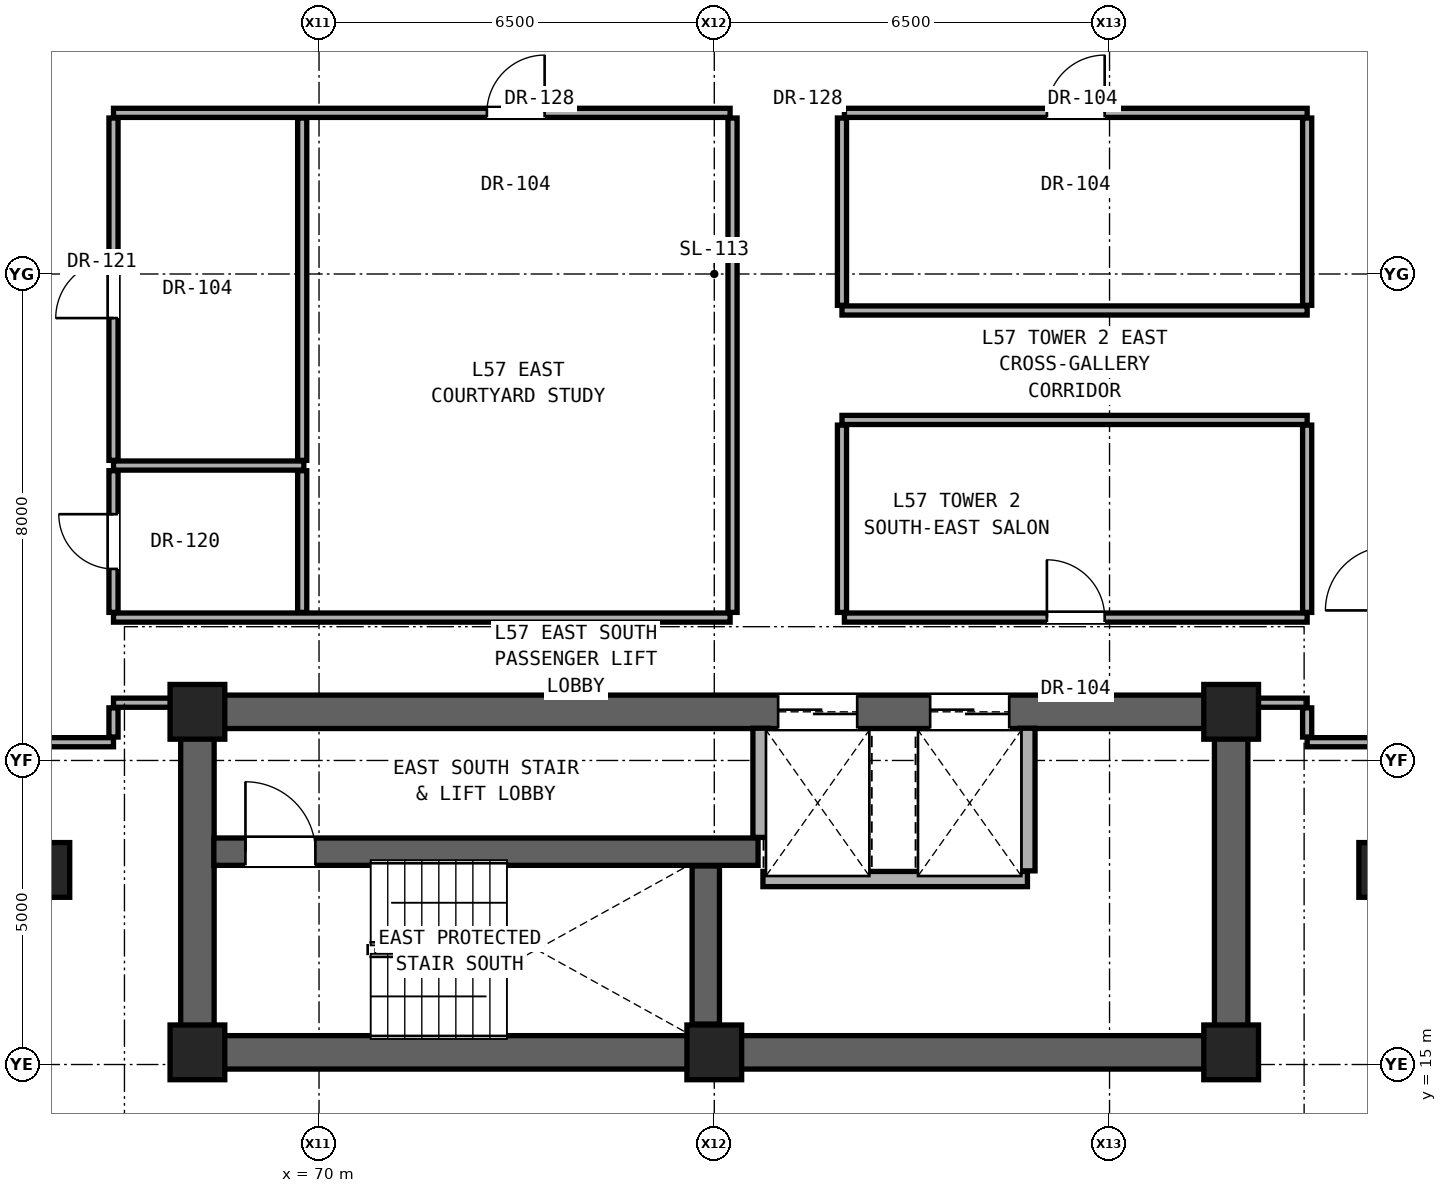
"""IFC4 building model, lengths in metres.
Left out: names, types, materials, properties, quantities, classifications, styles, units other than length and angle.
Written with IfcOpenShell. Run it as: python <this file> out.ifc"""

import sys

from ifc_helpers import new_model, si_unit, direction, frame, frame_2d, origin, origin_2d, place, context, subcontext, project, spatial, rectangle, extrude, element, fill, save


model = new_model("IFC4")
c1 = context("Model", 3, precision=1e-05, world=origin(), true_north=direction((0.0, 1.0)))
c2 = subcontext(c1, "Body", "Model", "MODEL_VIEW")
j1 = project(units=[si_unit("LENGTHUNIT", "METRE"), si_unit("PLANEANGLEUNIT", "RADIAN")], contexts=[c1])
p1 = place(None, origin())
s1 = spatial("IfcSite", under=j1, at=p1, CompositionType="ELEMENT")
p2 = place(p1, origin())
s2 = spatial("IfcBuilding", under=s1, at=p2, CompositionType="ELEMENT")
p3 = place(p2, frame((0.0, 0.0, 199.9)))
s3 = spatial("IfcBuildingStorey", under=s2, at=p3, CompositionType="ELEMENT", Elevation=199.9)
for number, where, z_axis, x_axis in (
    (1, (68.0, 15.2, 0.0), (0.0, 0.0, 1.0), (1.0, 0.0, 0.0)),
    (2, (76.5, 15.2, 0.0), (0.0, 0.0, 1.0), (1.0, 0.0, 0.0)),
    (3, (85.0, 15.2, 0.0), (0.0, 0.0, 1.0), (1.0, 0.0, 0.0)),
    (4, (68.0, 20.8, 0.0), (0.0, 0.0, 1.0), (1.0, 0.0, 0.0)),
    (5, (85.0, 20.8, 0.0), (0.0, 0.0, 1.0), (1.0, 0.0, 0.0)),
):
    element("IfcColumn", number, at=place(p3, frame(where, z_axis=z_axis, x_axis=x_axis)), inside=s3, PredefinedType="COLUMN", context=c2, shape_type="SweptSolid", body=[
        extrude(rectangle(XDim=0.9, YDim=0.9, at=origin_2d()), origin(), (0.0, 0.0, 1.0), 3.25),
    ])
for number, where, z_axis, x_axis in (
    (6, (65.6, 18.2, 0.0), (0.0, 0.0, 1.0), (1.0, 0.0, 0.0)),
    (7, (87.4, 18.2, 0.0), (0.0, 0.0, 1.0), (1.0, 0.0, 0.0)),
):
    element("IfcColumn", number, at=place(p3, frame(where, z_axis=z_axis, x_axis=x_axis)), inside=s3, PredefinedType="PILASTER", context=c2, shape_type="SweptSolid", body=[
        extrude(rectangle(XDim=0.6, YDim=0.9, at=origin_2d()), origin(), (0.0, 0.0, 1.0), 3.25),
    ])
p4 = place(p3, frame((68.0, 15.2, 0.0), z_axis=(0.0, 0.0, 1.0), x_axis=(1.0, 0.0, 0.0)))
e8 = element("IfcWall", 8, at=p4, inside=s3, PredefinedType="SHEAR", context=c2, shape_type="SweptSolid", body=[
    extrude(rectangle(XDim=17.0, YDim=0.55, at=frame_2d((8.5, 0.0))), origin(), (0.0, 0.0, 1.0), 3.05),
])
for number, where, z_axis, x_axis in (
    (9, (68.0, 15.2, 0.0), (0.0, 0.0, 1.0), (0.0, 1.0, 0.0)),
    (10, (85.0, 15.2, 0.0), (0.0, 0.0, 1.0), (0.0, 1.0, 0.0)),
):
    element("IfcWall", number, at=place(p3, frame(where, z_axis=z_axis, x_axis=x_axis)), inside=s3, PredefinedType="SHEAR", context=c2, shape_type="SweptSolid", body=[
        extrude(rectangle(XDim=5.6, YDim=0.55, at=frame_2d((2.8, 0.0))), origin(), (0.0, 0.0, 1.0), 3.05),
    ])
p5 = place(p3, frame((68.0, 20.8, 0.0), z_axis=(0.0, 0.0, 1.0), x_axis=(1.0, 0.0, 0.0)))
e11 = element("IfcWall", 11, at=p5, inside=s3, PredefinedType="SHEAR", context=c2, shape_type="SweptSolid", body=[
    extrude(rectangle(XDim=17.0, YDim=0.55, at=frame_2d((8.5, 0.0))), origin(), (0.0, 0.0, 1.0), 3.05),
])
p6 = place(p5, frame((9.55, 0.0, 0.0)))
e12 = element("IfcOpeningElement", 12, at=p6, cuts=e11, PredefinedType="OPENING", context=c2, shape_type="SweptSolid", body=[
    extrude(rectangle(XDim=1.3, YDim=2.3, at=frame_2d((0.65, 1.15))), frame((0.0, 0.285, 0.0), z_axis=(0.0, -1.0, 0.0), x_axis=(1.0, 0.0, 0.0)), (0.0, 0.0, 1.0), 0.57),
])
p7 = place(p5, frame((12.05, 0.0, 0.0)))
e13 = element("IfcOpeningElement", 13, at=p7, cuts=e11, PredefinedType="OPENING", context=c2, shape_type="SweptSolid", body=[
    extrude(rectangle(XDim=1.3, YDim=2.3, at=frame_2d((0.65, 1.15))), frame((0.0, 0.285, 0.0), z_axis=(0.0, -1.0, 0.0), x_axis=(1.0, 0.0, 0.0)), (0.0, 0.0, 1.0), 0.57),
])
p8 = place(p3, frame((77.3, 18.05, 0.0), z_axis=(0.0, 0.0, 1.0), x_axis=(1.0, 0.0, 0.0)))
e14 = element("IfcWall", 14, at=p8, inside=s3, PredefinedType="SOLIDWALL", context=c2, shape_type="SweptSolid", body=[
    extrude(rectangle(XDim=4.35, YDim=0.25, at=frame_2d((2.175, 0.0))), origin(), (0.0, 0.0, 1.0), 3.05),
])
p9 = place(p3, frame((68.27, 18.5, 0.0), z_axis=(0.0, 0.0, 1.0), x_axis=(1.0, 0.0, 0.0)))
e15 = element("IfcWall", 15, at=p9, inside=s3, PredefinedType="SHEAR", context=c2, shape_type="SweptSolid", body=[
    extrude(rectangle(XDim=8.95, YDim=0.45, at=frame_2d((4.475, 0.0))), origin(), (0.0, 0.0, 1.0), 3.05),
])
p10 = place(p9, frame((0.52, 0.0, 0.0)))
e16 = element("IfcOpeningElement", 16, at=p10, cuts=e15, PredefinedType="OPENING", context=c2, shape_type="SweptSolid", body=[
    extrude(rectangle(XDim=1.15, YDim=2.2, at=frame_2d((0.575, 1.1))), frame((0.0, 0.235, 0.0), z_axis=(0.0, -1.0, 0.0), x_axis=(1.0, 0.0, 0.0)), (0.0, 0.0, 1.0), 0.47),
])
p11 = place(p3, frame((65.25, 20.3, 0.0), z_axis=(0.0, 0.0, 1.0), x_axis=(1.0, 0.0, 0.0)))
e17 = element("IfcWall", 17, at=p11, inside=s3, PredefinedType="PARTITIONING", context=c2, shape_type="SweptSolid", body=[
    extrude(rectangle(XDim=1.37, YDim=0.15, at=frame_2d((0.685, 0.0))), origin(), (0.0, 0.0, 1.0), 3.05),
])
p12 = place(p3, frame((86.25, 20.3, 0.0), z_axis=(0.0, 0.0, 1.0), x_axis=(1.0, 0.0, 0.0)))
e18 = element("IfcWall", 18, at=p12, inside=s3, PredefinedType="PARTITIONING", context=c2, shape_type="SweptSolid", body=[
    extrude(rectangle(XDim=1.35, YDim=0.15, at=frame_2d((0.675, 0.0))), origin(), (0.0, 0.0, 1.0), 3.05),
])
p13 = place(p3, frame((66.62, 20.95, 0.0), z_axis=(0.0, 0.0, 1.0), x_axis=(1.0, 0.0, 0.0)))
e19 = element("IfcWall", 19, at=p13, inside=s3, PredefinedType="PARTITIONING", context=c2, shape_type="SweptSolid", body=[
    extrude(rectangle(XDim=1.11, YDim=0.15, at=frame_2d((0.555, 0.0))), origin(), (0.0, 0.0, 1.0), 2.442),
])
p14 = place(p3, frame((85.27, 20.95, 0.0), z_axis=(0.0, 0.0, 1.0), x_axis=(1.0, 0.0, 0.0)))
e20 = element("IfcWall", 20, at=p14, inside=s3, PredefinedType="PARTITIONING", context=c2, shape_type="SweptSolid", body=[
    extrude(rectangle(XDim=0.98, YDim=0.15, at=frame_2d((0.49, 0.0))), origin(), (0.0, 0.0, 1.0), 2.442),
])
p15 = place(p3, frame((66.62, 22.35, 0.0), z_axis=(0.0, 0.0, 1.0), x_axis=(1.0, 0.0, 0.0)))
e21 = element("IfcWall", 21, at=p15, inside=s3, PredefinedType="PARTITIONING", context=c2, shape_type="SweptSolid", body=[
    extrude(rectangle(XDim=10.14, YDim=0.15, at=frame_2d((5.07, 0.0))), origin(), (0.0, 0.0, 1.0), 2.186),
])
p16 = place(p3, frame((78.64, 22.35, 0.0), z_axis=(0.0, 0.0, 1.0), x_axis=(1.0, 0.0, 0.0)))
e22 = element("IfcWall", 22, at=p16, inside=s3, PredefinedType="PARTITIONING", context=c2, shape_type="SweptSolid", body=[
    extrude(rectangle(XDim=7.61, YDim=0.15, at=frame_2d((3.805, 0.0))), origin(), (0.0, 0.0, 1.0), 2.186),
])
p17 = place(p16, frame((3.33, 0.0, 0.0)))
e23 = element("IfcOpeningElement", 23, at=p17, cuts=e22, PredefinedType="OPENING", context=c2, shape_type="SweptSolid", body=[
    extrude(rectangle(XDim=0.95, YDim=2.15, at=frame_2d((0.475, 1.075))), frame((0.0, 0.085, 0.0), z_axis=(0.0, -1.0, 0.0), x_axis=(1.0, 0.0, 0.0)), (0.0, 0.0, 1.0), 0.17),
])
p18 = place(p3, frame((66.62, 24.85, 0.0), z_axis=(0.0, 0.0, 1.0), x_axis=(1.0, 0.0, 0.0)))
e24 = element("IfcWall", 24, at=p18, inside=s3, PredefinedType="PARTITIONING", context=c2, shape_type="SweptSolid", body=[
    extrude(rectangle(XDim=3.13, YDim=0.15, at=frame_2d((1.565, 0.0))), origin(), (0.0, 0.0, 1.0), 2.186),
])
for number, where, z_axis, x_axis in (
    (25, (78.6, 25.6, 0.0), (0.0, 0.0, 1.0), (1.0, 0.0, 0.0)),
    (26, (78.6, 27.4, 0.0), (0.0, 0.0, 1.0), (1.0, 0.0, 0.0)),
):
    element("IfcWall", number, at=place(p3, frame(where, z_axis=z_axis, x_axis=x_axis)), inside=s3, PredefinedType="PARTITIONING", context=c2, shape_type="SweptSolid", body=[
        extrude(rectangle(XDim=7.65, YDim=0.15, at=frame_2d((3.825, 0.0))), origin(), (0.0, 0.0, 1.0), 2.186),
    ])
p19 = place(p3, frame((66.62, 30.65, 0.0), z_axis=(0.0, 0.0, 1.0), x_axis=(1.0, 0.0, 0.0)))
e27 = element("IfcWall", 27, at=p19, inside=s3, PredefinedType="PARTITIONING", context=c2, shape_type="SweptSolid", body=[
    extrude(rectangle(XDim=10.14, YDim=0.15, at=frame_2d((5.07, 0.0))), origin(), (0.0, 0.0, 1.0), 2.186),
])
p20 = place(p19, frame((6.14, 0.0, 0.0)))
e28 = element("IfcOpeningElement", 28, at=p20, cuts=e27, PredefinedType="OPENING", context=c2, shape_type="SweptSolid", body=[
    extrude(rectangle(XDim=0.95, YDim=2.15, at=frame_2d((0.475, 1.075))), frame((0.0, 0.085, 0.0), z_axis=(0.0, -1.0, 0.0), x_axis=(1.0, 0.0, 0.0)), (0.0, 0.0, 1.0), 0.17),
])
p21 = place(p3, frame((78.64, 30.65, 0.0), z_axis=(0.0, 0.0, 1.0), x_axis=(1.0, 0.0, 0.0)))
e29 = element("IfcWall", 29, at=p21, inside=s3, PredefinedType="PARTITIONING", context=c2, shape_type="SweptSolid", body=[
    extrude(rectangle(XDim=7.61, YDim=0.15, at=frame_2d((3.805, 0.0))), origin(), (0.0, 0.0, 1.0), 2.186),
])
p22 = place(p21, frame((3.33, 0.0, 0.0)))
e30 = element("IfcOpeningElement", 30, at=p22, cuts=e29, PredefinedType="OPENING", context=c2, shape_type="SweptSolid", body=[
    extrude(rectangle(XDim=0.95, YDim=2.15, at=frame_2d((0.475, 1.075))), frame((0.0, 0.085, 0.0), z_axis=(0.0, -1.0, 0.0), x_axis=(1.0, 0.0, 0.0)), (0.0, 0.0, 1.0), 0.17),
])
p23 = place(p3, frame((66.62, 20.385, 0.0), z_axis=(0.0, 0.0, 1.0), x_axis=(0.0, 1.0, 0.0)))
e31 = element("IfcWall", 31, at=p23, inside=s3, PredefinedType="PARTITIONING", context=c2, shape_type="SweptSolid", body=[
    extrude(rectangle(XDim=0.48, YDim=0.15, at=frame_2d((0.24, 0.0))), origin(), (0.0, 0.0, 1.0), 2.442),
])
p24 = place(p3, frame((66.62, 22.435, 0.0), z_axis=(0.0, 0.0, 1.0), x_axis=(0.0, 1.0, 0.0)))
e32 = element("IfcWall", 32, at=p24, inside=s3, PredefinedType="PARTITIONING", context=c2, shape_type="SweptSolid", body=[
    extrude(rectangle(XDim=2.33, YDim=0.15, at=frame_2d((1.165, 0.0))), origin(), (0.0, 0.0, 1.0), 3.05),
])
p25 = place(p24, frame((0.715, 0.0, 0.0)))
e33 = element("IfcOpeningElement", 33, at=p25, cuts=e32, PredefinedType="OPENING", context=c2, shape_type="SweptSolid", body=[
    extrude(rectangle(XDim=0.9, YDim=2.1, at=frame_2d((0.45, 1.05))), frame((0.0, 0.085, 0.0), z_axis=(0.0, -1.0, 0.0), x_axis=(1.0, 0.0, 0.0)), (0.0, 0.0, 1.0), 0.17),
])
p26 = place(p3, frame((66.62, 24.935, 0.0), z_axis=(0.0, 0.0, 1.0), x_axis=(0.0, 1.0, 0.0)))
e34 = element("IfcWall", 34, at=p26, inside=s3, PredefinedType="PARTITIONING", context=c2, shape_type="SweptSolid", body=[
    extrude(rectangle(XDim=5.63, YDim=0.15, at=frame_2d((2.815, 0.0))), origin(), (0.0, 0.0, 1.0), 2.346),
])
p27 = place(p26, frame((2.34, 0.0, 0.0)))
e35 = element("IfcOpeningElement", 35, at=p27, cuts=e34, PredefinedType="OPENING", context=c2, shape_type="SweptSolid", body=[
    extrude(rectangle(XDim=0.95, YDim=2.15, at=frame_2d((0.475, 1.075))), frame((0.0, 0.085, 0.0), z_axis=(0.0, -1.0, 0.0), x_axis=(1.0, 0.0, 0.0)), (0.0, 0.0, 1.0), 0.17),
])
p28 = place(p3, frame((69.723, 22.435, 0.0), z_axis=(0.0, 0.0, 1.0), x_axis=(0.0, 1.0, 0.0)))
e36 = element("IfcWall", 36, at=p28, inside=s3, PredefinedType="PARTITIONING", context=c2, shape_type="SweptSolid", body=[
    extrude(rectangle(XDim=2.33, YDim=0.15, at=frame_2d((1.165, 0.0))), origin(), (0.0, 0.0, 1.0), 3.05),
])
p29 = place(p3, frame((69.723, 24.935, 0.0), z_axis=(0.0, 0.0, 1.0), x_axis=(0.0, 1.0, 0.0)))
e37 = element("IfcWall", 37, at=p29, inside=s3, PredefinedType="PARTITIONING", context=c2, shape_type="SweptSolid", body=[
    extrude(rectangle(XDim=5.63, YDim=0.15, at=frame_2d((2.815, 0.0))), origin(), (0.0, 0.0, 1.0), 2.186),
])
p30 = place(p3, frame((76.36, 15.665, 0.0), z_axis=(0.0, 0.0, 1.0), x_axis=(0.0, 1.0, 0.0)))
e38 = element("IfcWall", 38, at=p30, inside=s3, PredefinedType="SHEAR", context=c2, shape_type="SweptSolid", body=[
    extrude(rectangle(XDim=2.6, YDim=0.45, at=frame_2d((1.3, 0.0))), origin(), (0.0, 0.0, 1.0), 3.05),
])
p31 = place(p3, frame((76.8, 22.435, 0.0), z_axis=(0.0, 0.0, 1.0), x_axis=(0.0, 1.0, 0.0)))
e39 = element("IfcWall", 39, at=p31, inside=s3, PredefinedType="PARTITIONING", context=c2, shape_type="SweptSolid", body=[
    extrude(rectangle(XDim=8.13, YDim=0.15, at=frame_2d((4.065, 0.0))), origin(), (0.0, 0.0, 1.0), 2.186),
])
p32 = place(p3, frame((77.26, 18.735, 0.0), z_axis=(0.0, 0.0, 1.0), x_axis=(0.0, 1.0, 0.0)))
e40 = element("IfcWall", 40, at=p32, inside=s3, PredefinedType="SOLIDWALL", context=c2, shape_type="SweptSolid", body=[
    extrude(rectangle(XDim=1.795, YDim=0.25, at=frame_2d((0.897, 0.0))), origin(), (0.0, 0.0, 1.0), 3.05),
])
p33 = place(p3, frame((78.6, 22.435, 0.0), z_axis=(0.0, 0.0, 1.0), x_axis=(0.0, 1.0, 0.0)))
e41 = element("IfcWall", 41, at=p33, inside=s3, PredefinedType="PARTITIONING", context=c2, shape_type="SweptSolid", body=[
    extrude(rectangle(XDim=3.08, YDim=0.15, at=frame_2d((1.54, 0.0))), origin(), (0.0, 0.0, 1.0), 3.05),
])
p34 = place(p3, frame((78.6, 27.485, 0.0), z_axis=(0.0, 0.0, 1.0), x_axis=(0.0, 1.0, 0.0)))
e42 = element("IfcWall", 42, at=p34, inside=s3, PredefinedType="PARTITIONING", context=c2, shape_type="SweptSolid", body=[
    extrude(rectangle(XDim=3.08, YDim=0.15, at=frame_2d((1.54, 0.0))), origin(), (0.0, 0.0, 1.0), 2.186),
])
p35 = place(p3, frame((81.65, 18.185, 0.0), z_axis=(0.0, 0.0, 1.0), x_axis=(0.0, 1.0, 0.0)))
e43 = element("IfcWall", 43, at=p35, inside=s3, PredefinedType="SOLIDWALL", context=c2, shape_type="SweptSolid", body=[
    extrude(rectangle(XDim=2.345, YDim=0.25, at=frame_2d((1.172, 0.0))), origin(), (0.0, 0.0, 1.0), 3.05),
])
p36 = place(p3, frame((86.25, 20.385, 0.0), z_axis=(0.0, 0.0, 1.0), x_axis=(0.0, 1.0, 0.0)))
e44 = element("IfcWall", 44, at=p36, inside=s3, PredefinedType="PARTITIONING", context=c2, shape_type="SweptSolid", body=[
    extrude(rectangle(XDim=0.48, YDim=0.15, at=frame_2d((0.24, 0.0))), origin(), (0.0, 0.0, 1.0), 2.442),
])
p37 = place(p3, frame((86.25, 22.435, 0.0), z_axis=(0.0, 0.0, 1.0), x_axis=(0.0, 1.0, 0.0)))
e45 = element("IfcWall", 45, at=p37, inside=s3, PredefinedType="PARTITIONING", context=c2, shape_type="SweptSolid", body=[
    extrude(rectangle(XDim=3.08, YDim=0.15, at=frame_2d((1.54, 0.0))), origin(), (0.0, 0.0, 1.0), 3.05),
])
p38 = place(p3, frame((86.25, 27.485, 0.0), z_axis=(0.0, 0.0, 1.0), x_axis=(0.0, 1.0, 0.0)))
e46 = element("IfcWall", 46, at=p38, inside=s3, PredefinedType="PARTITIONING", context=c2, shape_type="SweptSolid", body=[
    extrude(rectangle(XDim=3.08, YDim=0.15, at=frame_2d((1.54, 0.0))), origin(), (0.0, 0.0, 1.0), 2.346),
])
p39 = place(p10, origin())
e47 = element("IfcDoor", 47, at=p39, inside=s3, OperationType="SINGLE_SWING_LEFT", PredefinedType="DOOR", context=c2, shape_type="SweptSolid", body=[
    extrude(rectangle(XDim=1.15, YDim=2.2, at=frame_2d((0.575, 1.1))), frame((0.0, 0.025, 0.0), z_axis=(0.0, -1.0, 0.0), x_axis=(1.0, 0.0, 0.0)), (0.0, 0.0, 1.0), 0.05),
])
fill(e16, e47)
p40 = place(p25, origin())
e48 = element("IfcDoor", 48, at=p40, inside=s3, OperationType="SINGLE_SWING_RIGHT", PredefinedType="DOOR", context=c2, shape_type="SweptSolid", body=[
    extrude(rectangle(XDim=0.9, YDim=2.1, at=frame_2d((0.45, 1.05))), frame((0.0, 0.025, 0.0), z_axis=(0.0, -1.0, 0.0), x_axis=(1.0, 0.0, 0.0)), (0.0, 0.0, 1.0), 0.05),
])
fill(e33, e48)
p41 = place(p27, origin())
e49 = element("IfcDoor", 49, at=p41, inside=s3, OperationType="SINGLE_SWING_LEFT", PredefinedType="DOOR", context=c2, shape_type="SweptSolid", body=[
    extrude(rectangle(XDim=0.95, YDim=2.15, at=frame_2d((0.475, 1.075))), frame((0.0, 0.025, 0.0), z_axis=(0.0, -1.0, 0.0), x_axis=(1.0, 0.0, 0.0)), (0.0, 0.0, 1.0), 0.05),
])
fill(e35, e49)
p42 = place(p20, origin())
e50 = element("IfcDoor", 50, at=p42, inside=s3, OperationType="SINGLE_SWING_RIGHT", PredefinedType="DOOR", context=c2, shape_type="SweptSolid", body=[
    extrude(rectangle(XDim=0.95, YDim=2.15, at=frame_2d((0.475, 1.075))), frame((0.0, 0.025, 0.0), z_axis=(0.0, -1.0, 0.0), x_axis=(1.0, 0.0, 0.0)), (0.0, 0.0, 1.0), 0.05),
])
fill(e28, e50)
p43 = place(p17, origin())
e51 = element("IfcDoor", 51, at=p43, inside=s3, OperationType="SINGLE_SWING_LEFT", PredefinedType="DOOR", context=c2, shape_type="SweptSolid", body=[
    extrude(rectangle(XDim=0.95, YDim=2.15, at=frame_2d((0.475, 1.075))), frame((0.0, 0.025, 0.0), z_axis=(0.0, -1.0, 0.0), x_axis=(1.0, 0.0, 0.0)), (0.0, 0.0, 1.0), 0.05),
])
fill(e23, e51)
p44 = place(p22, origin())
e52 = element("IfcDoor", 52, at=p44, inside=s3, OperationType="SINGLE_SWING_RIGHT", PredefinedType="DOOR", context=c2, shape_type="SweptSolid", body=[
    extrude(rectangle(XDim=0.95, YDim=2.15, at=frame_2d((0.475, 1.075))), frame((0.0, 0.025, 0.0), z_axis=(0.0, -1.0, 0.0), x_axis=(1.0, 0.0, 0.0)), (0.0, 0.0, 1.0), 0.05),
])
fill(e30, e52)
p45 = place(p6, origin())
e53 = element("IfcDoor", 53, at=p45, inside=s3, OperationType="DOUBLE_DOOR_SLIDING", PredefinedType="DOOR", context=c2, shape_type="SweptSolid", body=[
    extrude(rectangle(XDim=1.3, YDim=2.3, at=frame_2d((0.65, 1.15))), frame((0.0, 0.025, 0.0), z_axis=(0.0, -1.0, 0.0), x_axis=(1.0, 0.0, 0.0)), (0.0, 0.0, 1.0), 0.05),
])
fill(e12, e53)
p46 = place(p7, origin())
e54 = element("IfcDoor", 54, at=p46, inside=s3, OperationType="DOUBLE_DOOR_SLIDING", PredefinedType="DOOR", context=c2, shape_type="SweptSolid", body=[
    extrude(rectangle(XDim=1.3, YDim=2.3, at=frame_2d((0.65, 1.15))), frame((0.0, 0.025, 0.0), z_axis=(0.0, -1.0, 0.0), x_axis=(1.0, 0.0, 0.0)), (0.0, 0.0, 1.0), 0.05),
])
fill(e13, e54)
save(model, sys.argv[1])
